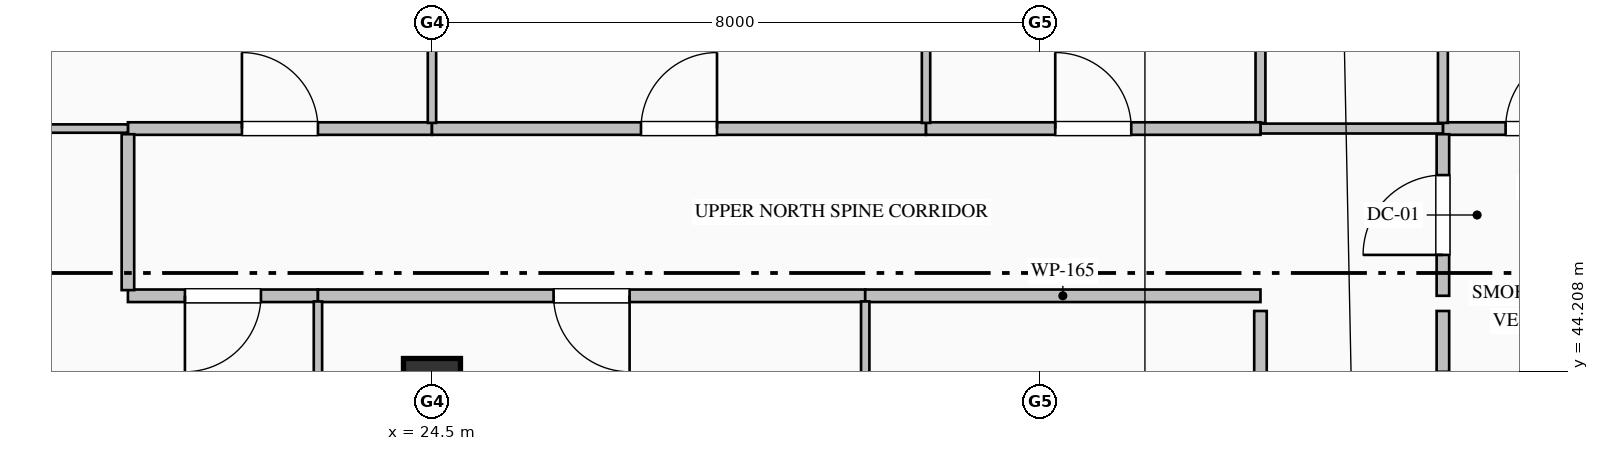
"""IFC4 building model, lengths in metres.
Left out: names, types, materials, properties, quantities, classifications, styles, units other than length and angle.
Written with IfcOpenShell. Run it as: python <this file> out.ifc"""

import sys

from ifc_helpers import new_model, si_unit, direction, frame, frame_2d, origin, origin_2d, place, context, subcontext, project, spatial, rectangle, extrude, element, fill, save


model = new_model("IFC4")
c1 = context("Model", 3, precision=1e-05, world=origin(), true_north=direction((0.0, 1.0)))
c2 = subcontext(c1, "Body", "Model", "MODEL_VIEW")
j1 = project(units=[si_unit("LENGTHUNIT", "METRE"), si_unit("PLANEANGLEUNIT", "RADIAN")], contexts=[c1])
p1 = place(None, origin())
s1 = spatial("IfcSite", under=j1, at=p1, CompositionType="ELEMENT")
p2 = place(p1, origin())
s2 = spatial("IfcBuilding", under=s1, at=p2, CompositionType="ELEMENT")
p3 = place(p2, frame((0.0, 0.0, 359.2)))
s3 = spatial("IfcBuildingStorey", under=s2, at=p3, CompositionType="ELEMENT", Elevation=359.2)
p4 = place(p3, frame((24.5, 44.0, 0.0), z_axis=(0.0, 0.0, 1.0), x_axis=(1.0, 0.0, 0.0)))
e1 = element("IfcColumn", 1, at=p4, inside=s3, PredefinedType="COLUMN", context=c2, shape_type="SweptSolid", body=[
    extrude(rectangle(XDim=0.75, YDim=0.75, at=origin_2d()), origin(), (0.0, 0.0, 1.0), 4.0),
])
p5 = place(p3, frame((16.62, 47.88, 0.0), z_axis=(0.0, 0.0, 1.0), x_axis=(0.707106781187, 0.707106781187, 0.0)))
e2 = element("IfcWall", 2, at=p5, inside=s3, PredefinedType="SOLIDWALL", context=c2, shape_type="SweptSolid", body=[
    extrude(rectangle(XDim=5.657, YDim=0.34, at=frame_2d((2.828, 0.0))), origin(), (0.0, 0.0, 1.0), 3.785),
])
p6 = place(p3, frame((37.8, 47.4, 0.0), z_axis=(0.0, 0.0, 1.0), x_axis=(1.0, 0.0, 0.0)))
e3 = element("IfcWall", 3, at=p6, inside=s3, PredefinedType="PARTITIONING", context=c2, shape_type="SweptSolid", body=[
    extrude(rectangle(XDim=2.7, YDim=0.165, at=frame_2d((1.35, 0.0))), origin(), (0.0, 0.0, 1.0), 3.785),
])
p7 = place(p6, frame((0.825, 0.0, 0.0)))
e4 = element("IfcOpeningElement", 4, at=p7, cuts=e3, PredefinedType="OPENING", context=c2, shape_type="SweptSolid", body=[
    extrude(rectangle(XDim=1.05, YDim=2.15, at=frame_2d((0.525, 1.075))), frame((0.0, 0.093, 0.0), z_axis=(0.0, -1.0, 0.0), x_axis=(1.0, 0.0, 0.0)), (0.0, 0.0, 1.0), 0.185),
])
p8 = place(p3, frame((37.8, 45.2, 0.0), z_axis=(0.0, 0.0, 1.0), x_axis=(0.0, 1.0, 0.0)))
e5 = element("IfcWall", 5, at=p8, inside=s3, PredefinedType="PARTITIONING", context=c2, shape_type="SweptSolid", body=[
    extrude(rectangle(XDim=2.125, YDim=0.165, at=frame_2d((1.063, 0.0))), origin(), (0.0, 0.0, 1.0), 3.785),
])
p9 = place(p8, frame((0.538, 0.0, 0.0)))
e6 = element("IfcOpeningElement", 6, at=p9, cuts=e5, PredefinedType="OPENING", context=c2, shape_type="SweptSolid", body=[
    extrude(rectangle(XDim=1.05, YDim=2.15, at=frame_2d((0.525, 1.075))), frame((0.0, 0.093, 0.0), z_axis=(0.0, -1.0, 0.0), x_axis=(1.0, 0.0, 0.0)), (0.0, 0.0, 1.0), 0.185),
])
p10 = place(p3, frame((37.8, 44.2, 0.0), z_axis=(0.0, 0.0, 1.0), x_axis=(0.0, 1.0, 0.0)))
e7 = element("IfcWall", 7, at=p10, inside=s3, PredefinedType="PARTITIONING", context=c2, shape_type="SweptSolid", body=[
    extrude(rectangle(XDim=0.8, YDim=0.165, at=frame_2d((0.4, 0.0))), origin(), (0.0, 0.0, 1.0), 3.785),
])
p11 = place(p3, frame((37.8, 47.475, 0.0), z_axis=(0.0, 0.0, 1.0), x_axis=(0.0, 1.0, 0.0)))
e8 = element("IfcWall", 8, at=p11, inside=s3, PredefinedType="PARTITIONING", context=c2, shape_type="SweptSolid", body=[
    extrude(rectangle(XDim=4.193, YDim=0.13, at=frame_2d((2.097, 0.0))), origin(), (0.0, 0.0, 1.0), 3.785),
])
p12 = place(p11, frame((1.587, 0.0, 0.0)))
e9 = element("IfcOpeningElement", 9, at=p12, cuts=e8, PredefinedType="OPENING", context=c2, shape_type="SweptSolid", body=[
    extrude(rectangle(XDim=1.02, YDim=2.15, at=frame_2d((0.51, 1.075))), frame((0.0, 0.075, 0.0), z_axis=(0.0, -1.0, 0.0), x_axis=(1.0, 0.0, 0.0)), (0.0, 0.0, 1.0), 0.15),
])
p13 = place(p3, frame((37.8, 47.4, 0.0), z_axis=(0.0, 0.0, 1.0), x_axis=(-1.0, 0.0, 0.0)))
e10 = element("IfcWall", 10, at=p13, inside=s3, PredefinedType="PARTITIONING", context=c2, shape_type="SweptSolid", body=[
    extrude(rectangle(XDim=2.4, YDim=0.13, at=frame_2d((1.2, 0.0))), origin(), (0.0, 0.0, 1.0), 3.785),
])
p14 = place(p3, frame((35.4, 47.475, 0.0), z_axis=(0.0, 0.0, 1.0), x_axis=(0.0, 1.0, 0.0)))
e11 = element("IfcWall", 11, at=p14, inside=s3, PredefinedType="PARTITIONING", context=c2, shape_type="SweptSolid", body=[
    extrude(rectangle(XDim=4.193, YDim=0.13, at=frame_2d((2.097, 0.0))), origin(), (0.0, 0.0, 1.0), 3.785),
])
p15 = place(p3, frame((20.5, 47.4, 0.0), z_axis=(0.0, 0.0, 1.0), x_axis=(1.0, 0.0, 0.0)))
e12 = element("IfcWall", 12, at=p15, inside=s3, PredefinedType="PARTITIONING", context=c2, shape_type="SweptSolid", body=[
    extrude(rectangle(XDim=4.0, YDim=0.165, at=frame_2d((2.0, 0.0))), origin(), (0.0, 0.0, 1.0), 3.785),
])
p16 = place(p15, frame((1.5, 0.0, 0.0)))
e13 = element("IfcOpeningElement", 13, at=p16, cuts=e12, PredefinedType="OPENING", context=c2, shape_type="SweptSolid", body=[
    extrude(rectangle(XDim=1.0, YDim=2.15, at=frame_2d((0.5, 1.075))), frame((0.0, 0.093, 0.0), z_axis=(0.0, -1.0, 0.0), x_axis=(1.0, 0.0, 0.0)), (0.0, 0.0, 1.0), 0.185),
])
p17 = place(p3, frame((24.5, 47.4, 0.0), z_axis=(0.0, 0.0, 1.0), x_axis=(1.0, 0.0, 0.0)))
e14 = element("IfcWall", 14, at=p17, inside=s3, PredefinedType="PARTITIONING", context=c2, shape_type="SweptSolid", body=[
    extrude(rectangle(XDim=6.5, YDim=0.165, at=frame_2d((3.25, 0.0))), origin(), (0.0, 0.0, 1.0), 3.785),
])
p18 = place(p17, frame((2.75, 0.0, 0.0)))
e15 = element("IfcOpeningElement", 15, at=p18, cuts=e14, PredefinedType="OPENING", context=c2, shape_type="SweptSolid", body=[
    extrude(rectangle(XDim=1.0, YDim=2.15, at=frame_2d((0.5, 1.075))), frame((0.0, 0.093, 0.0), z_axis=(0.0, -1.0, 0.0), x_axis=(1.0, 0.0, 0.0)), (0.0, 0.0, 1.0), 0.185),
])
p19 = place(p3, frame((31.0, 47.4, 0.0), z_axis=(0.0, 0.0, 1.0), x_axis=(1.0, 0.0, 0.0)))
e16 = element("IfcWall", 16, at=p19, inside=s3, PredefinedType="PARTITIONING", context=c2, shape_type="SweptSolid", body=[
    extrude(rectangle(XDim=4.4, YDim=0.165, at=frame_2d((2.2, 0.0))), origin(), (0.0, 0.0, 1.0), 3.785),
])
p20 = place(p19, frame((1.7, 0.0, 0.0)))
e17 = element("IfcOpeningElement", 17, at=p20, cuts=e16, PredefinedType="OPENING", context=c2, shape_type="SweptSolid", body=[
    extrude(rectangle(XDim=1.0, YDim=2.15, at=frame_2d((0.5, 1.075))), frame((0.0, 0.093, 0.0), z_axis=(0.0, -1.0, 0.0), x_axis=(1.0, 0.0, 0.0)), (0.0, 0.0, 1.0), 0.185),
])
p21 = place(p3, frame((23.0, 45.2, 0.0), z_axis=(0.0, 0.0, 1.0), x_axis=(-1.0, 0.0, 0.0)))
e18 = element("IfcWall", 18, at=p21, inside=s3, PredefinedType="PARTITIONING", context=c2, shape_type="SweptSolid", body=[
    extrude(rectangle(XDim=2.5, YDim=0.165, at=frame_2d((1.25, 0.0))), origin(), (0.0, 0.0, 1.0), 3.785),
])
p22 = place(p21, frame((0.75, 0.0, 0.0)))
e19 = element("IfcOpeningElement", 19, at=p22, cuts=e18, PredefinedType="OPENING", context=c2, shape_type="SweptSolid", body=[
    extrude(rectangle(XDim=1.0, YDim=2.15, at=frame_2d((0.5, 1.075))), frame((0.0, 0.093, 0.0), z_axis=(0.0, -1.0, 0.0), x_axis=(1.0, 0.0, 0.0)), (0.0, 0.0, 1.0), 0.185),
])
p23 = place(p3, frame((20.5, 45.274, 0.0), z_axis=(0.0, 0.0, 1.0), x_axis=(0.0, 1.0, 0.0)))
e20 = element("IfcWall", 20, at=p23, inside=s3, PredefinedType="PARTITIONING", context=c2, shape_type="SweptSolid", body=[
    extrude(rectangle(XDim=2.051, YDim=0.165, at=frame_2d((1.025, 0.0))), origin(), (0.0, 0.0, 1.0), 3.785),
])
p24 = place(p3, frame((30.2, 45.2, 0.0), z_axis=(0.0, 0.0, 1.0), x_axis=(-1.0, 0.0, 0.0)))
e21 = element("IfcWall", 21, at=p24, inside=s3, PredefinedType="PARTITIONING", context=c2, shape_type="SweptSolid", body=[
    extrude(rectangle(XDim=7.2, YDim=0.165, at=frame_2d((3.6, 0.0))), origin(), (0.0, 0.0, 1.0), 3.785),
])
p25 = place(p24, frame((3.1, 0.0, 0.0)))
e22 = element("IfcOpeningElement", 22, at=p25, cuts=e21, PredefinedType="OPENING", context=c2, shape_type="SweptSolid", body=[
    extrude(rectangle(XDim=1.0, YDim=2.15, at=frame_2d((0.5, 1.075))), frame((0.0, 0.093, 0.0), z_axis=(0.0, -1.0, 0.0), x_axis=(1.0, 0.0, 0.0)), (0.0, 0.0, 1.0), 0.185),
])
p26 = place(p3, frame((35.4, 45.2, 0.0), z_axis=(0.0, 0.0, 1.0), x_axis=(-1.0, 0.0, 0.0)))
e23 = element("IfcWall", 23, at=p26, inside=s3, PredefinedType="PARTITIONING", context=c2, shape_type="SweptSolid", body=[
    extrude(rectangle(XDim=5.2, YDim=0.165, at=frame_2d((2.6, 0.0))), origin(), (0.0, 0.0, 1.0), 3.785),
])
p27 = place(p3, frame((35.4, 33.6, 0.0), z_axis=(0.0, 0.0, 1.0), x_axis=(0.0, 1.0, 0.0)))
e24 = element("IfcWall", 24, at=p27, inside=s3, PredefinedType="PARTITIONING", context=c2, shape_type="SweptSolid", body=[
    extrude(rectangle(XDim=11.4, YDim=0.165, at=frame_2d((5.7, 0.0))), origin(), (0.0, 0.0, 1.0), 3.785),
])
p28 = place(p27, frame((5.2, 0.0, 0.0)))
e25 = element("IfcOpeningElement", 25, at=p28, cuts=e24, PredefinedType="OPENING", context=c2, shape_type="SweptSolid", body=[
    extrude(rectangle(XDim=1.0, YDim=2.15, at=frame_2d((0.5, 1.075))), frame((0.0, 0.093, 0.0), z_axis=(0.0, -1.0, 0.0), x_axis=(1.0, 0.0, 0.0)), (0.0, 0.0, 1.0), 0.185),
])
p29 = place(p3, frame((24.5, 51.668, 0.0), z_axis=(0.0, 0.0, 1.0), x_axis=(0.0, -1.0, 0.0)))
e26 = element("IfcWall", 26, at=p29, inside=s3, PredefinedType="MOVABLE", context=c2, shape_type="SweptSolid", body=[
    extrude(rectangle(XDim=4.193, YDim=0.11, at=frame_2d((2.097, 0.0))), origin(), (0.0, 0.0, 1.0), 3.177),
])
p30 = place(p3, frame((20.5, 47.4, 0.0), z_axis=(0.0, 0.0, 1.0), x_axis=(-1.0, 0.0, 0.0)))
e27 = element("IfcWall", 27, at=p30, inside=s3, PredefinedType="MOVABLE", context=c2, shape_type="SweptSolid", body=[
    extrude(rectangle(XDim=3.668, YDim=0.11, at=frame_2d((1.834, 0.0))), origin(), (0.0, 0.0, 1.0), 3.785),
])
p31 = place(p3, frame((31.0, 51.668, 0.0), z_axis=(0.0, 0.0, 1.0), x_axis=(0.0, -1.0, 0.0)))
e28 = element("IfcWall", 28, at=p31, inside=s3, PredefinedType="MOVABLE", context=c2, shape_type="SweptSolid", body=[
    extrude(rectangle(XDim=4.193, YDim=0.11, at=frame_2d((2.097, 0.0))), origin(), (0.0, 0.0, 1.0), 3.785),
])
for number, where, z_axis, x_axis in (
    (29, (23.0, 45.125, 0.0), (0.0, 0.0, 1.0), (0.0, -1.0, 0.0)),
    (30, (30.2, 45.125, 0.0), (0.0, 0.0, 1.0), (0.0, -1.0, 0.0)),
):
    element("IfcWall", number, at=place(p3, frame(where, z_axis=z_axis, x_axis=x_axis)), inside=s3, PredefinedType="MOVABLE", context=c2, shape_type="SweptSolid", body=[
        extrude(rectangle(XDim=16.793, YDim=0.11, at=frame_2d((8.397, 0.0))), origin(), (0.0, 0.0, 1.0), 3.785),
    ])
p32 = place(p7, origin())
e31 = element("IfcDoor", 31, at=p32, inside=s3, OperationType="SINGLE_SWING_RIGHT", PredefinedType="DOOR", context=c2, shape_type="SweptSolid", body=[
    extrude(rectangle(XDim=1.05, YDim=2.15, at=frame_2d((0.525, 1.075))), frame((0.0, 0.025, 0.0), z_axis=(0.0, -1.0, 0.0), x_axis=(1.0, 0.0, 0.0)), (0.0, 0.0, 1.0), 0.05),
])
fill(e4, e31)
p33 = place(p9, origin())
e32 = element("IfcDoor", 32, at=p33, inside=s3, OperationType="SINGLE_SWING_LEFT", PredefinedType="DOOR", context=c2, shape_type="SweptSolid", body=[
    extrude(rectangle(XDim=1.05, YDim=2.15, at=frame_2d((0.525, 1.075))), frame((0.0, 0.025, 0.0), z_axis=(0.0, -1.0, 0.0), x_axis=(1.0, 0.0, 0.0)), (0.0, 0.0, 1.0), 0.05),
])
fill(e6, e32)
p34 = place(p16, origin())
e33 = element("IfcDoor", 33, at=p34, inside=s3, OperationType="SINGLE_SWING_LEFT", PredefinedType="DOOR", context=c2, shape_type="SweptSolid", body=[
    extrude(rectangle(XDim=1.0, YDim=2.15, at=frame_2d((0.5, 1.075))), frame((0.0, 0.025, 0.0), z_axis=(0.0, -1.0, 0.0), x_axis=(1.0, 0.0, 0.0)), (0.0, 0.0, 1.0), 0.05),
])
fill(e13, e33)
p35 = place(p18, origin())
e34 = element("IfcDoor", 34, at=p35, inside=s3, OperationType="SINGLE_SWING_RIGHT", PredefinedType="DOOR", context=c2, shape_type="SweptSolid", body=[
    extrude(rectangle(XDim=1.0, YDim=2.15, at=frame_2d((0.5, 1.075))), frame((0.0, 0.025, 0.0), z_axis=(0.0, -1.0, 0.0), x_axis=(1.0, 0.0, 0.0)), (0.0, 0.0, 1.0), 0.05),
])
fill(e15, e34)
p36 = place(p20, origin())
e35 = element("IfcDoor", 35, at=p36, inside=s3, OperationType="SINGLE_SWING_LEFT", PredefinedType="DOOR", context=c2, shape_type="SweptSolid", body=[
    extrude(rectangle(XDim=1.0, YDim=2.15, at=frame_2d((0.5, 1.075))), frame((0.0, 0.025, 0.0), z_axis=(0.0, -1.0, 0.0), x_axis=(1.0, 0.0, 0.0)), (0.0, 0.0, 1.0), 0.05),
])
fill(e17, e35)
p37 = place(p22, origin())
e36 = element("IfcDoor", 36, at=p37, inside=s3, OperationType="SINGLE_SWING_RIGHT", PredefinedType="DOOR", context=c2, shape_type="SweptSolid", body=[
    extrude(rectangle(XDim=1.0, YDim=2.15, at=frame_2d((0.5, 1.075))), frame((0.0, 0.025, 0.0), z_axis=(0.0, -1.0, 0.0), x_axis=(1.0, 0.0, 0.0)), (0.0, 0.0, 1.0), 0.05),
])
fill(e19, e36)
p38 = place(p25, origin())
e37 = element("IfcDoor", 37, at=p38, inside=s3, OperationType="SINGLE_SWING_LEFT", PredefinedType="DOOR", context=c2, shape_type="SweptSolid", body=[
    extrude(rectangle(XDim=1.0, YDim=2.15, at=frame_2d((0.5, 1.075))), frame((0.0, 0.025, 0.0), z_axis=(0.0, -1.0, 0.0), x_axis=(1.0, 0.0, 0.0)), (0.0, 0.0, 1.0), 0.05),
])
fill(e22, e37)
save(model, sys.argv[1])
